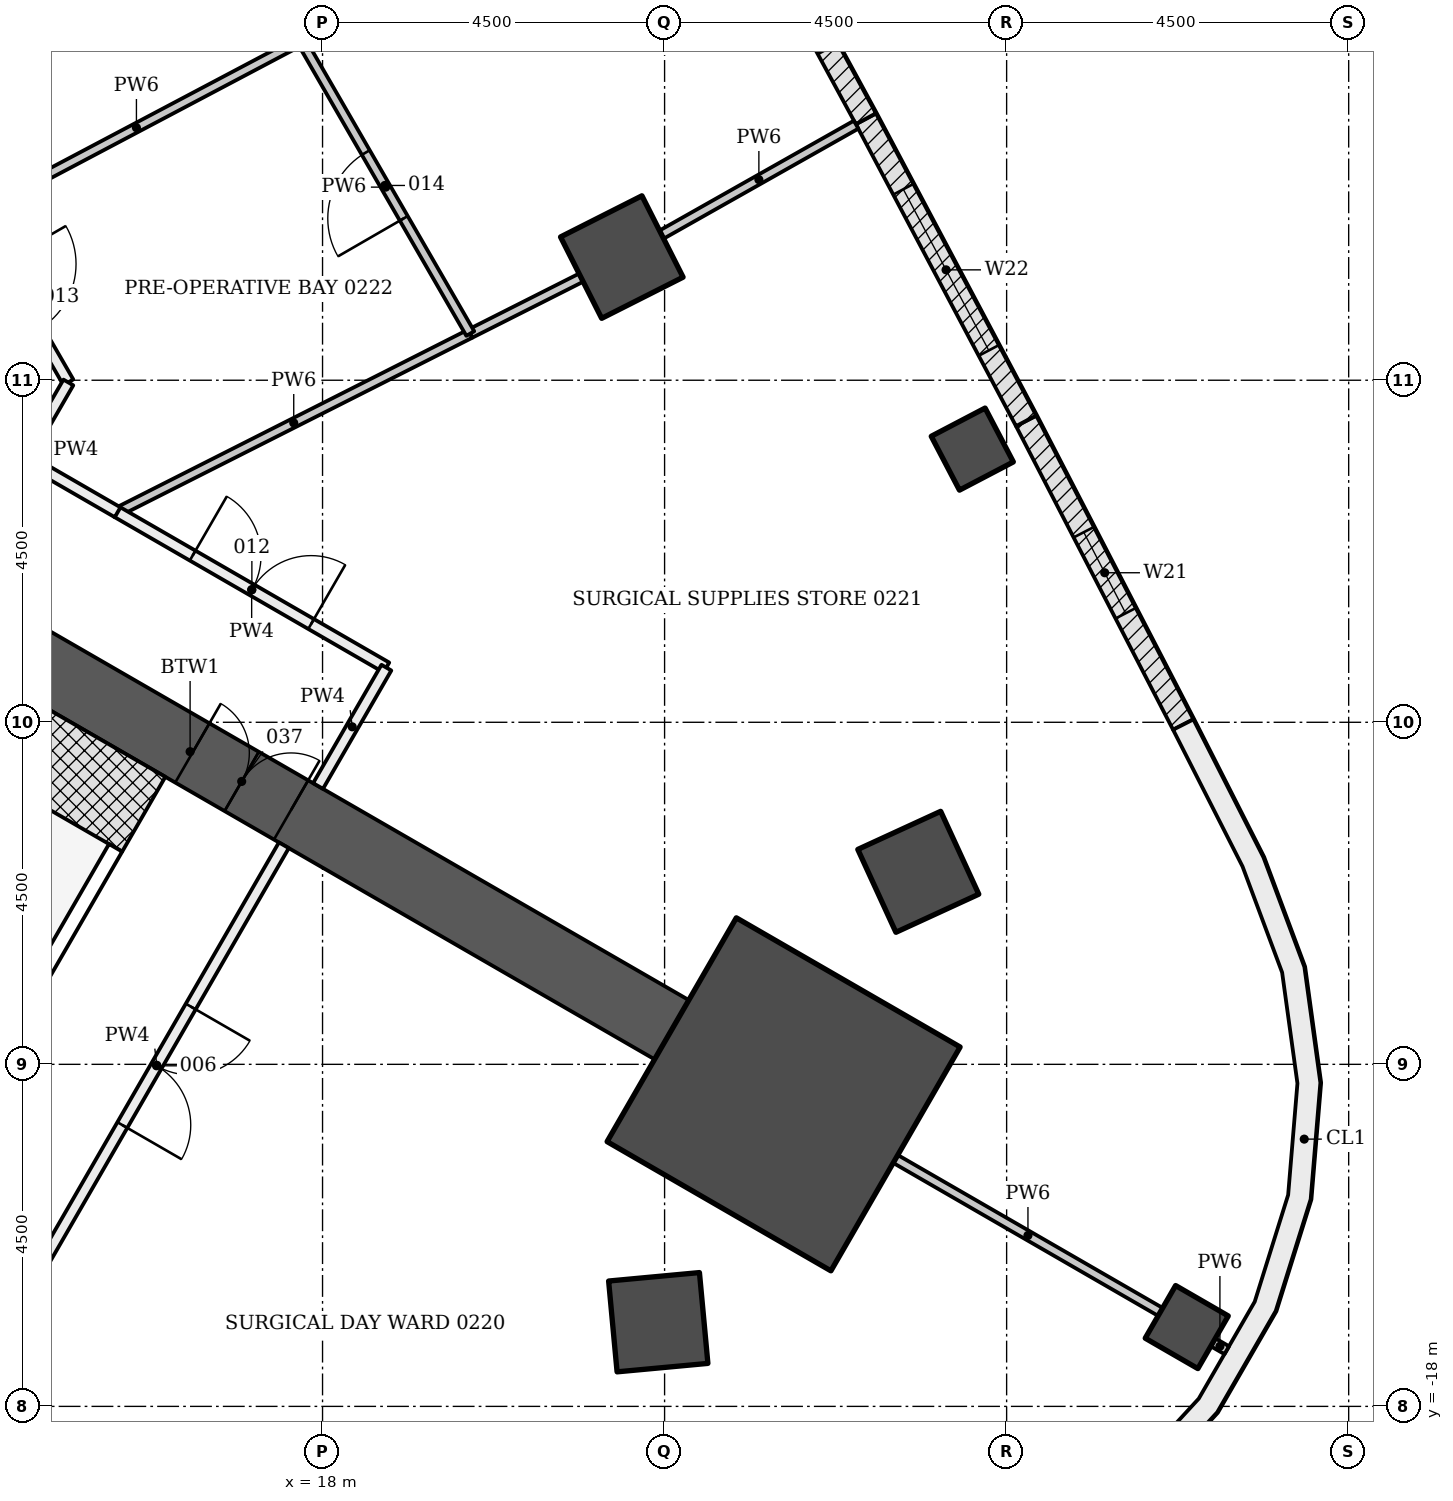
"""IFC4 building model, lengths in metres.
Left out: names, types, materials, properties, quantities, classifications, styles, units other than length and angle.
Written with IfcOpenShell. Run it as: python <this file> out.ifc"""

import sys

from ifc_helpers import new_model, si_unit, direction, frame, frame_2d, origin, origin_2d, place, context, subcontext, project, spatial, polyline, rectangle, outline, extrude, element, fill, save


model = new_model("IFC4")
c1 = context("Model", 3, precision=1e-05, world=origin(), true_north=direction((0.0, 1.0)))
c2 = subcontext(c1, "Body", "Model", "MODEL_VIEW")
j1 = project(units=[si_unit("LENGTHUNIT", "METRE"), si_unit("PLANEANGLEUNIT", "RADIAN")], contexts=[c1])
p1 = place(None, origin())
s1 = spatial("IfcSite", under=j1, at=p1, CompositionType="ELEMENT")
p2 = place(p1, origin())
s2 = spatial("IfcBuilding", under=s1, at=p2, CompositionType="ELEMENT")
p3 = place(p2, frame((0.0, 0.0, 10.5)))
s3 = spatial("IfcBuildingStorey", under=s2, at=p3, CompositionType="ELEMENT", Elevation=10.5)
for number, where, z_axis, x_axis in (
    (1, (22.417, -16.893, -0.25), (0.0, 0.0, 1.0), (0.093, -0.996, 0.0)),
    (2, (25.838, -10.967, -0.25), (0.0, 0.0, 1.0), (0.909, 0.418, 0.0)),
    (3, (21.937, -2.88, -0.25), (0.0, 0.0, 1.0), (0.893, 0.451, 0.0)),
):
    element("IfcColumn", number, at=place(p3, frame(where, z_axis=z_axis, x_axis=x_axis)), inside=s3, PredefinedType="COLUMN", context=c2, shape_type="SweptSolid", body=[
        extrude(rectangle(XDim=1.2, YDim=1.2, at=origin_2d()), origin(), (0.0, 0.0, 1.0), 4.5),
    ])
for number, where, z_axis, x_axis in (
    (4, (29.37, -16.957, -0.25), (0.0, 0.0, 1.0), (0.866, -0.5, 0.0)),
    (5, (26.548, -5.406, -0.25), (0.0, 0.0, 1.0), (0.886, 0.464, 0.0)),
):
    element("IfcColumn", number, at=place(p3, frame(where, z_axis=z_axis, x_axis=x_axis)), inside=s3, PredefinedType="COLUMN", context=c2, shape_type="SweptSolid", body=[
        extrude(rectangle(XDim=0.8, YDim=0.8, at=origin_2d()), origin(), (0.0, 0.0, 1.0), 4.5),
    ])
p4 = place(p3, frame((9.922, -5.728, -0.25), z_axis=(0.0, 0.0, 1.0), x_axis=(0.866028046028, -0.499995423472, 0.0)))
e6 = element("IfcWall", 6, at=p4, inside=s3, PredefinedType="SHEAR", context=c2, shape_type="SweptSolid", body=[
    extrude(rectangle(XDim=14.633, YDim=0.9, at=frame_2d((7.316, 0.0))), origin(), (0.0, 0.0, 1.0), 4.5),
])
p5 = place(p4, frame((7.35, 0.0, 0.25)))
e7 = element("IfcOpeningElement", 7, at=p5, cuts=e6, PredefinedType="OPENING", context=c2, shape_type="SweptSolid", body=[
    extrude(rectangle(XDim=1.5, YDim=2.1, at=frame_2d((0.75, 1.05))), frame((0.0, 0.46, 0.0), z_axis=(0.0, -1.0, 0.0), x_axis=(1.0, 0.0, 0.0)), (0.0, 0.0, 1.0), 0.92),
])
p6 = place(p3, frame((24.066, -13.895, -0.25), z_axis=(0.0, 0.0, 1.0), x_axis=(0.866025403784, -0.5, 0.0)))
e8 = element("IfcColumn", 8, at=p6, inside=s3, PredefinedType="COLUMN", context=c2, shape_type="SweptSolid", body=[
    extrude(rectangle(XDim=3.4, YDim=3.4, at=origin_2d()), origin(), (0.0, 0.0, 1.0), 4.5),
])
p7 = place(p3, frame((27.258, -5.036, 0.0), z_axis=(0.0, 0.0, 1.0), x_axis=(0.459443600121, -0.888206945654, 0.0)))
e9 = element("IfcWall", 9, at=p7, inside=s3, PredefinedType="NOTDEFINED", context=c2, shape_type="SweptSolid", body=[
    extrude(rectangle(XDim=4.496, YDim=0.3, at=frame_2d((2.248, 0.0))), origin(), (0.0, 0.0, 1.0), 4.25),
])
p8 = place(p7, frame((1.648, 0.0, 0.8)))
e10 = element("IfcOpeningElement", 10, at=p8, cuts=e9, PredefinedType="OPENING", context=c2, shape_type="SweptSolid", body=[
    extrude(rectangle(XDim=1.2, YDim=3.0, at=frame_2d((0.6, 1.5))), frame((0.0, 0.16, 0.0), z_axis=(0.0, -1.0, 0.0), x_axis=(1.0, 0.0, 0.0)), (0.0, 0.0, 1.0), 0.32),
])
p9 = place(p3, frame((25.15, -1.062, 0.0), z_axis=(0.0, 0.0, 1.0), x_axis=(0.468566202388, -0.883428386447, 0.0)))
e11 = element("IfcWall", 11, at=p9, inside=s3, PredefinedType="NOTDEFINED", context=c2, shape_type="SweptSolid", body=[
    extrude(rectangle(XDim=4.496, YDim=0.3, at=frame_2d((2.248, 0.0))), origin(), (0.0, 0.0, 1.0), 4.25),
])
p10 = place(p9, frame((1.048, 0.0, 0.9)))
e12 = element("IfcOpeningElement", 12, at=p10, cuts=e11, PredefinedType="OPENING", context=c2, shape_type="SweptSolid", body=[
    extrude(rectangle(XDim=2.4, YDim=2.4, at=frame_2d((1.2, 1.2))), frame((0.0, 0.16, 0.0), z_axis=(0.0, -1.0, 0.0), x_axis=(1.0, 0.0, 0.0)), (0.0, 0.0, 1.0), 0.32),
])
p11 = place(p3, frame((23.001, 2.89, 0.0), z_axis=(0.0, 0.0, 1.0), x_axis=(0.477577109439, -0.878589838628, 0.0)))
e13 = element("IfcWall", 13, at=p11, inside=s3, PredefinedType="NOTDEFINED", context=c2, shape_type="SweptSolid", body=[
    extrude(rectangle(XDim=4.496, YDim=0.3, at=frame_2d((2.248, 0.0))), origin(), (0.0, 0.0, 1.0), 4.25),
])
p12 = place(p11, frame((1.048, 0.0, 0.9)))
e14 = element("IfcOpeningElement", 14, at=p12, cuts=e13, PredefinedType="OPENING", context=c2, shape_type="SweptSolid", body=[
    extrude(rectangle(XDim=2.4, YDim=2.4, at=frame_2d((1.2, 1.2))), frame((0.0, 0.16, 0.0), z_axis=(0.0, -1.0, 0.0), x_axis=(1.0, 0.0, 0.0)), (0.0, 0.0, 1.0), 0.32),
])
p13 = place(p3, origin())
e15 = element("IfcWall", 15, at=p13, inside=s3, PredefinedType="NOTDEFINED", context=c2, shape_type="SweptSolid", body=[
    extrude(outline(polyline([(22.49, -21.03), (24.522, -20.921), (26.04, -20.666), (27.465, -20.086), (28.729, -19.209), (29.771, -18.077), (30.54, -16.744), (31.0, -15.276), (31.128, -13.742), (30.917, -12.218), (30.379, -10.776), (29.457, -8.962), (29.19, -9.098), (30.104, -10.897), (30.625, -12.292), (30.826, -13.75), (30.704, -15.218), (30.264, -16.623), (29.528, -17.898), (28.531, -18.981), (27.321, -19.821), (25.957, -20.376), (24.489, -20.622), (22.474, -20.73), (22.49, -21.03)])), origin(), (0.0, 0.0, 1.0), 4.25),
])
p14 = place(p3, frame((9.413, -6.61, -0.25), z_axis=(0.0, 0.0, 1.0), x_axis=(0.866018442252, -0.500012057535, 0.0)))
e16 = element("IfcWall", 16, at=p14, inside=s3, PredefinedType="SHEAR", context=c2, shape_type="SweptSolid", body=[
    extrude(rectangle(XDim=7.2, YDim=1.136, at=frame_2d((3.6, 0.0))), origin(), (0.0, 0.0, 1.0), 4.5),
])
p15 = place(p3, frame((0.0, 0.0, -0.25)))
e17 = element("IfcWall", 17, at=p15, inside=s3, PredefinedType="SHEAR", context=c2, shape_type="SweptSolid", body=[
    extrude(outline(polyline([(12.104, -13.149), (14.289, -12.563), (15.364, -10.701), (15.191, -10.601), (14.157, -12.392), (12.132, -12.934), (12.204, -12.976), (12.204, -12.976), (12.204, -12.976), (12.204, -12.976), (12.204, -12.976), (12.204, -12.976), (12.204, -12.976), (12.204, -12.976), (12.204, -12.976), (12.204, -12.976), (12.204, -12.976), (12.204, -12.976), (12.204, -12.976), (12.204, -12.976), (12.204, -12.976), (12.204, -12.976), (12.204, -12.976), (12.104, -13.149)])), origin(), (0.0, 0.0, 1.0), 4.5),
])
p16 = place(p3, frame((17.491, -10.618, 0.0), z_axis=(0.0, 0.0, 1.0), x_axis=(-0.499969057507, -0.866043267704, 0.0)))
e18 = element("IfcWall", 18, at=p16, inside=s3, PredefinedType="PARTITIONING", context=c2, shape_type="SweptSolid", body=[
    extrude(rectangle(XDim=6.685, YDim=0.15, at=frame_2d((3.342, 0.0))), origin(), (0.0, 0.0, 1.0), 3.638),
])
p17 = place(p16, frame((2.45, 0.0, 0.0)))
e19 = element("IfcOpeningElement", 19, at=p17, cuts=e18, PredefinedType="OPENING", context=c2, shape_type="SweptSolid", body=[
    extrude(rectangle(XDim=1.8, YDim=2.1, at=frame_2d((0.9, 1.05))), frame((0.0, 0.085, 0.0), z_axis=(0.0, -1.0, 0.0), x_axis=(1.0, 0.0, 0.0)), (0.0, 0.0, 1.0), 0.17),
])
p18 = place(p3, frame((29.023, -16.757, 0.0), z_axis=(0.0, 0.0, 1.0), x_axis=(-0.866027971625, 0.499995552344, 0.0)))
e20 = element("IfcWall", 20, at=p18, inside=s3, PredefinedType="PARTITIONING", context=c2, shape_type="SweptSolid", body=[
    extrude(rectangle(XDim=4.024, YDim=0.12, at=frame_2d((2.012, 0.0))), origin(), (0.0, 0.0, 1.0), 3.717),
])
p19 = place(p3, frame((29.896, -17.261, 0.0), z_axis=(0.0, 0.0, 1.0), x_axis=(-0.865774595023, 0.500434162116, 0.0)))
e21 = element("IfcWall", 21, at=p19, inside=s3, PredefinedType="PARTITIONING", context=c2, shape_type="SweptSolid", body=[
    extrude(rectangle(XDim=0.208, YDim=0.12, at=frame_2d((0.104, 0.0))), origin(), (0.0, 0.0, 1.0), 4.25),
])
p20 = place(p3, frame((19.942, -3.888, 0.0), z_axis=(0.0, 0.0, 1.0), x_axis=(-0.89239982182, -0.451245562877, 0.0)))
e22 = element("IfcWall", 22, at=p20, inside=s3, PredefinedType="PARTITIONING", context=c2, shape_type="SweptSolid", body=[
    extrude(rectangle(XDim=5.201, YDim=0.12, at=frame_2d((2.601, 0.0))), origin(), (0.0, 0.0, 1.0), 3.638),
])
p21 = place(p3, frame((21.401, -3.151, 0.0), z_axis=(0.0, 0.0, 1.0), x_axis=(-0.892653768212, -0.450742997834, 0.0)))
e23 = element("IfcWall", 23, at=p21, inside=s3, PredefinedType="PARTITIONING", context=c2, shape_type="SweptSolid", body=[
    extrude(rectangle(XDim=1.631, YDim=0.12, at=frame_2d((0.815, 0.0))), origin(), (0.0, 0.0, 1.0), 3.638),
])
p22 = place(p3, frame((25.02, -1.138, 0.0), z_axis=(0.0, 0.0, 1.0), x_axis=(-0.870620069476, -0.491955988505, 0.0)))
e24 = element("IfcWall", 24, at=p22, inside=s3, PredefinedType="PARTITIONING", context=c2, shape_type="SweptSolid", body=[
    extrude(rectangle(XDim=2.939, YDim=0.12, at=frame_2d((1.47, 0.0))), origin(), (0.0, 0.0, 1.0), 3.633),
])
p23 = place(p3, frame((15.295, -6.232, 0.0), z_axis=(0.0, 0.0, 1.0), x_axis=(0.865991915229, -0.500057999394, 0.0)))
e25 = element("IfcWall", 25, at=p23, inside=s3, PredefinedType="PARTITIONING", context=c2, shape_type="SweptSolid", body=[
    extrude(rectangle(XDim=4.094, YDim=0.15, at=frame_2d((2.047, 0.0))), origin(), (0.0, 0.0, 1.0), 3.638),
])
p24 = place(p23, frame((1.15, 0.0, 0.0)))
e26 = element("IfcOpeningElement", 26, at=p24, cuts=e25, PredefinedType="OPENING", context=c2, shape_type="SweptSolid", body=[
    extrude(rectangle(XDim=1.8, YDim=2.1, at=frame_2d((0.9, 1.05))), frame((0.0, 0.085, 0.0), z_axis=(0.0, -1.0, 0.0), x_axis=(1.0, 0.0, 0.0)), (0.0, 0.0, 1.0), 0.17),
])
p25 = place(p3, frame((18.84, -8.281, 0.0), z_axis=(0.0, 0.0, 1.0), x_axis=(-0.500126010714, -0.86595263924, 0.0)))
e27 = element("IfcWall", 27, at=p25, inside=s3, PredefinedType="PARTITIONING", context=c2, shape_type="SweptSolid", body=[
    extrude(rectangle(XDim=1.798, YDim=0.15, at=frame_2d((0.899, 0.0))), origin(), (0.0, 0.0, 1.0), 3.638),
])
p26 = place(p3, frame((19.944, -3.886, 0.0), z_axis=(0.0, 0.0, 1.0), x_axis=(-0.500092923031, 0.865971748, 0.0)))
e28 = element("IfcWall", 28, at=p26, inside=s3, PredefinedType="PARTITIONING", context=c2, shape_type="SweptSolid", body=[
    extrude(rectangle(XDim=4.449, YDim=0.12, at=frame_2d((2.225, 0.0))), origin(), (0.0, 0.0, 1.0), 3.638),
])
p27 = place(p26, frame((1.75, 0.0, 0.0)))
e29 = element("IfcOpeningElement", 29, at=p27, cuts=e28, PredefinedType="OPENING", context=c2, shape_type="SweptSolid", body=[
    extrude(rectangle(XDim=1.0, YDim=2.1, at=frame_2d((0.5, 1.05))), frame((0.0, 0.07, 0.0), z_axis=(0.0, -1.0, 0.0), x_axis=(1.0, 0.0, 0.0)), (0.0, 0.0, 1.0), 0.14),
])
p28 = place(p3, frame((17.719, -0.032, 0.0), z_axis=(0.0, 0.0, 1.0), x_axis=(-0.884039689759, -0.467411838672, 0.0)))
e30 = element("IfcWall", 30, at=p28, inside=s3, PredefinedType="PARTITIONING", context=c2, shape_type="SweptSolid", body=[
    extrude(rectangle(XDim=4.904, YDim=0.12, at=frame_2d((2.452, 0.0))), origin(), (0.0, 0.0, 1.0), 3.638),
])
p29 = place(p3, frame((13.382, -2.321, 0.0), z_axis=(0.0, 0.0, 1.0), x_axis=(0.500076401611, -0.8659812888, 0.0)))
e31 = element("IfcWall", 31, at=p29, inside=s3, PredefinedType="PARTITIONING", context=c2, shape_type="SweptSolid", body=[
    extrude(rectangle(XDim=2.547, YDim=0.15, at=frame_2d((1.274, 0.0))), origin(), (0.0, 0.0, 1.0), 3.638),
])
p30 = place(p29, frame((0.75, 0.0, 0.0)))
e32 = element("IfcOpeningElement", 32, at=p30, cuts=e31, PredefinedType="OPENING", context=c2, shape_type="SweptSolid", body=[
    extrude(rectangle(XDim=1.0, YDim=2.1, at=frame_2d((0.5, 1.05))), frame((0.0, 0.085, 0.0), z_axis=(0.0, -1.0, 0.0), x_axis=(1.0, 0.0, 0.0)), (0.0, 0.0, 1.0), 0.17),
])
p31 = place(p3, frame((14.656, -4.529, 0.0), z_axis=(0.0, 0.0, 1.0), x_axis=(-0.500502949238, -0.865734831114, 0.0)))
e33 = element("IfcWall", 33, at=p31, inside=s3, PredefinedType="PARTITIONING", context=c2, shape_type="SweptSolid", body=[
    extrude(rectangle(XDim=1.155, YDim=0.15, at=frame_2d((0.578, 0.0))), origin(), (0.0, 0.0, 1.0), 4.25),
])
p32 = place(p3, frame((14.078, -5.529, 0.0), z_axis=(0.0, 0.0, 1.0), x_axis=(0.865984561414, -0.500070734389, 0.0)))
e34 = element("IfcWall", 34, at=p32, inside=s3, PredefinedType="PARTITIONING", context=c2, shape_type="SweptSolid", body=[
    extrude(rectangle(XDim=1.416, YDim=0.15, at=frame_2d((0.708, 0.0))), origin(), (0.0, 0.0, 1.0), 3.638),
])
p33 = place(p8, origin())
e35 = element("IfcWindow", 35, at=p33, inside=s3, PartitioningType="SINGLE_PANEL", PredefinedType="WINDOW", context=c2, shape_type="SweptSolid", body=[
    extrude(rectangle(XDim=1.2, YDim=3.0, at=frame_2d((0.6, 1.5))), frame((0.0, 0.03, 0.0), z_axis=(0.0, -1.0, 0.0), x_axis=(1.0, 0.0, 0.0)), (0.0, 0.0, 1.0), 0.06),
])
fill(e10, e35)
p34 = place(p10, origin())
e36 = element("IfcWindow", 36, at=p34, inside=s3, PartitioningType="DOUBLE_PANEL_VERTICAL", PredefinedType="WINDOW", context=c2, shape_type="SweptSolid", body=[
    extrude(rectangle(XDim=2.4, YDim=2.4, at=frame_2d((1.2, 1.2))), frame((0.0, 0.03, 0.0), z_axis=(0.0, -1.0, 0.0), x_axis=(1.0, 0.0, 0.0)), (0.0, 0.0, 1.0), 0.06),
])
fill(e12, e36)
p35 = place(p17, origin())
e37 = element("IfcDoor", 37, at=p35, inside=s3, OperationType="DOUBLE_DOOR_SINGLE_SWING", PredefinedType="DOOR", context=c2, shape_type="SweptSolid", body=[
    extrude(rectangle(XDim=1.8, YDim=2.1, at=frame_2d((0.9, 1.05))), frame((0.0, 0.025, 0.0), z_axis=(0.0, -1.0, 0.0), x_axis=(1.0, 0.0, 0.0)), (0.0, 0.0, 1.0), 0.05),
])
fill(e19, e37)
p36 = place(p24, origin())
e38 = element("IfcDoor", 38, at=p36, inside=s3, OperationType="DOUBLE_DOOR_SINGLE_SWING", PredefinedType="DOOR", context=c2, shape_type="SweptSolid", body=[
    extrude(rectangle(XDim=1.8, YDim=2.1, at=frame_2d((0.9, 1.05))), frame((0.0, 0.025, 0.0), z_axis=(0.0, -1.0, 0.0), x_axis=(1.0, 0.0, 0.0)), (0.0, 0.0, 1.0), 0.05),
])
fill(e26, e38)
p37 = place(p27, origin())
e39 = element("IfcDoor", 39, at=p37, inside=s3, OperationType="SINGLE_SWING_LEFT", PredefinedType="DOOR", context=c2, shape_type="SweptSolid", body=[
    extrude(rectangle(XDim=1.0, YDim=2.1, at=frame_2d((0.5, 1.05))), frame((0.0, 0.025, 0.0), z_axis=(0.0, -1.0, 0.0), x_axis=(1.0, 0.0, 0.0)), (0.0, 0.0, 1.0), 0.05),
])
fill(e29, e39)
p38 = place(p5, origin())
e40 = element("IfcDoor", 40, at=p38, inside=s3, OperationType="DOUBLE_DOOR_SINGLE_SWING", PredefinedType="DOOR", context=c2, shape_type="SweptSolid", body=[
    extrude(rectangle(XDim=1.5, YDim=2.1, at=frame_2d((0.75, 1.05))), frame((0.0, 0.025, 0.0), z_axis=(0.0, -1.0, 0.0), x_axis=(1.0, 0.0, 0.0)), (0.0, 0.0, 1.0), 0.05),
])
fill(e7, e40)
save(model, sys.argv[1])
